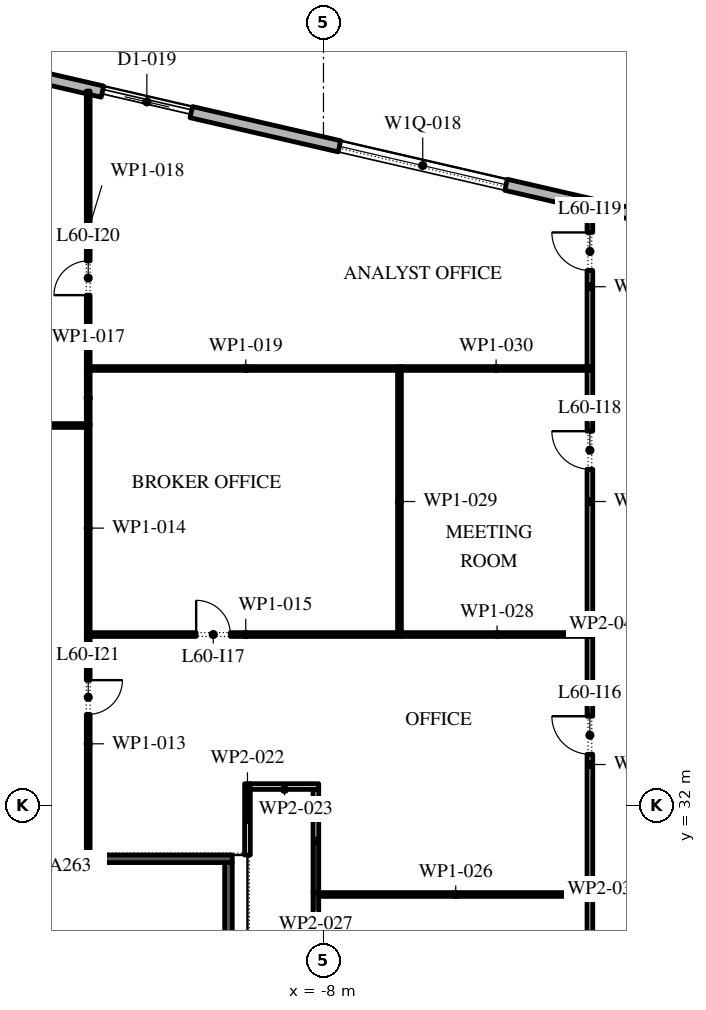
"""IFC4 building model, lengths in metres.
Left out: names, types, materials, properties, quantities, classifications, styles, units other than length and angle.
Written with IfcOpenShell. Run it as: python <this file> out.ifc"""

import sys

from ifc_helpers import new_model, si_unit, direction, frame, frame_2d, origin, place, context, subcontext, project, spatial, rectangle, extrude, element, fill, save


model = new_model("IFC4")
c1 = context("Model", 3, precision=1e-05, world=origin(), true_north=direction((0.0, 1.0)))
c2 = subcontext(c1, "Body", "Model", "MODEL_VIEW")
j1 = project(units=[si_unit("LENGTHUNIT", "METRE"), si_unit("PLANEANGLEUNIT", "RADIAN")], contexts=[c1])
p1 = place(None, origin())
s1 = spatial("IfcSite", under=j1, at=p1, CompositionType="ELEMENT")
p2 = place(p1, origin())
s2 = spatial("IfcBuilding", under=s1, at=p2, CompositionType="ELEMENT")
p3 = place(p2, frame((0.0, 0.0, 276.6)))
s3 = spatial("IfcBuildingStorey", under=s2, at=p3, CompositionType="ELEMENT", Elevation=276.6)
p4 = place(p3, frame((29.616, 40.758, 0.0), z_axis=(0.0, 0.0, 1.0), x_axis=(-0.974370532314, 0.224949029246, 0.0)))
e1 = element("IfcWall", 1, at=p4, inside=s3, PredefinedType="STANDARD", context=c2, shape_type="SweptSolid", body=[
    extrude(rectangle(XDim=48.0, YDim=0.3, at=frame_2d((24.0, 0.0))), origin(), (0.0, 0.0, 1.0), 4.0),
])
p5 = place(p4, frame((1.625, 0.0, 0.45)))
e2 = element("IfcOpeningElement", 2, at=p5, cuts=e1, PredefinedType="OPENING", context=c2, shape_type="SweptSolid", body=[
    extrude(rectangle(XDim=4.5, YDim=2.575, at=frame_2d((2.25, 1.288))), frame((0.0, 0.16, 0.0), z_axis=(0.0, -1.0, 0.0), x_axis=(1.0, 0.0, 0.0)), (0.0, 0.0, 1.0), 0.32),
])
p6 = place(p4, frame((10.575, 0.0, 0.0)))
e3 = element("IfcOpeningElement", 3, at=p6, cuts=e1, PredefinedType="OPENING", context=c2, shape_type="SweptSolid", body=[
    extrude(rectangle(XDim=2.4, YDim=3.5, at=frame_2d((1.2, 1.75))), frame((0.0, 0.16, 0.0), z_axis=(0.0, -1.0, 0.0), x_axis=(1.0, 0.0, 0.0)), (0.0, 0.0, 1.0), 0.32),
])
p7 = place(p4, frame((17.575, 0.0, 0.45)))
e4 = element("IfcOpeningElement", 4, at=p7, cuts=e1, PredefinedType="OPENING", context=c2, shape_type="SweptSolid", body=[
    extrude(rectangle(XDim=4.5, YDim=2.45, at=frame_2d((2.25, 1.225))), frame((0.0, 0.16, 0.0), z_axis=(0.0, -1.0, 0.0), x_axis=(1.0, 0.0, 0.0)), (0.0, 0.0, 1.0), 0.32),
])
p8 = place(p4, frame((25.625, 0.0, 0.45)))
e5 = element("IfcOpeningElement", 5, at=p8, cuts=e1, PredefinedType="OPENING", context=c2, shape_type="SweptSolid", body=[
    extrude(rectangle(XDim=4.5, YDim=2.45, at=frame_2d((2.25, 1.225))), frame((0.0, 0.16, 0.0), z_axis=(0.0, -1.0, 0.0), x_axis=(1.0, 0.0, 0.0)), (0.0, 0.0, 1.0), 0.32),
])
p9 = place(p4, frame((33.675, 0.0, 0.45)))
e6 = element("IfcOpeningElement", 6, at=p9, cuts=e1, PredefinedType="OPENING", context=c2, shape_type="SweptSolid", body=[
    extrude(rectangle(XDim=4.5, YDim=2.45, at=frame_2d((2.25, 1.225))), frame((0.0, 0.16, 0.0), z_axis=(0.0, -1.0, 0.0), x_axis=(1.0, 0.0, 0.0)), (0.0, 0.0, 1.0), 0.32),
])
p10 = place(p4, frame((42.175, 0.0, 0.0)))
e7 = element("IfcOpeningElement", 7, at=p10, cuts=e1, PredefinedType="OPENING", context=c2, shape_type="SweptSolid", body=[
    extrude(rectangle(XDim=2.4, YDim=3.5, at=frame_2d((1.2, 1.75))), frame((0.0, 0.16, 0.0), z_axis=(0.0, -1.0, 0.0), x_axis=(1.0, 0.0, 0.0)), (0.0, 0.0, 1.0), 0.32),
])
p11 = place(p3, frame((-10.5, 25.75, 0.0), z_axis=(0.0, 0.0, 1.0), x_axis=(0.0, 1.0, 0.0)))
e8 = element("IfcWall", 8, at=p11, inside=s3, PredefinedType="SHEAR", context=c2, shape_type="SweptSolid", body=[
    extrude(rectangle(XDim=4.75, YDim=0.2, at=frame_2d((2.375, 0.0))), origin(), (0.0, 0.0, 1.0), 4.0),
])
p12 = place(p11, frame((1.925, 0.0, 0.0)))
e9 = element("IfcOpeningElement", 9, at=p12, cuts=e8, PredefinedType="OPENING", context=c2, shape_type="SweptSolid", body=[
    extrude(rectangle(XDim=0.9, YDim=2.1, at=frame_2d((0.45, 1.05))), frame((0.0, 0.11, 0.0), z_axis=(0.0, -1.0, 0.0), x_axis=(1.0, 0.0, 0.0)), (0.0, 0.0, 1.0), 0.22),
])
p13 = place(p3, frame((-21.6, 30.6, 0.0), z_axis=(0.0, 0.0, 1.0), x_axis=(1.0, 0.0, 0.0)))
e10 = element("IfcWall", 10, at=p13, inside=s3, PredefinedType="SHEAR", context=c2, shape_type="SweptSolid", body=[
    extrude(rectangle(XDim=11.2, YDim=0.2, at=frame_2d((5.6, 0.0))), origin(), (0.0, 0.0, 1.0), 4.0),
])
p14 = place(p3, frame((-14.19, 30.7, 0.0), z_axis=(0.0, 0.0, 1.0), x_axis=(0.0, 1.0, 0.0)))
e11 = element("IfcWall", 11, at=p14, inside=s3, PredefinedType="PARTITIONING", context=c2, shape_type="SweptSolid", body=[
    extrude(rectangle(XDim=5.85, YDim=0.1, at=frame_2d((2.925, 0.0))), origin(), (0.0, 0.0, 1.0), 4.0),
])
p15 = place(p14, frame((3.7, 0.0, 0.0)))
e12 = element("IfcOpeningElement", 12, at=p15, cuts=e11, PredefinedType="OPENING", context=c2, shape_type="SweptSolid", body=[
    extrude(rectangle(XDim=0.9, YDim=2.1, at=frame_2d((0.45, 1.05))), frame((0.0, 0.06, 0.0), z_axis=(0.0, -1.0, 0.0), x_axis=(1.0, 0.0, 0.0)), (0.0, 0.0, 1.0), 0.12),
])
p16 = place(p3, frame((-14.19, 36.55, 0.0), z_axis=(0.0, 0.0, 1.0), x_axis=(0.0, 1.0, 0.0)))
e13 = element("IfcWall", 13, at=p16, inside=s3, PredefinedType="PARTITIONING", context=c2, shape_type="SweptSolid", body=[
    extrude(rectangle(XDim=5.5, YDim=0.1, at=frame_2d((2.75, 0.0))), origin(), (0.0, 0.0, 1.0), 4.0),
])
p17 = place(p3, frame((-14.14, 36.5, 0.0), z_axis=(0.0, 0.0, 1.0), x_axis=(1.0, 0.0, 0.0)))
e14 = element("IfcWall", 14, at=p17, inside=s3, PredefinedType="PARTITIONING", context=c2, shape_type="SweptSolid", body=[
    extrude(rectangle(XDim=8.19, YDim=0.1, at=frame_2d((4.095, 0.0))), origin(), (0.0, 0.0, 1.0), 4.0),
])
p18 = place(p17, frame((2.79, 0.0, 0.0)))
e15 = element("IfcOpeningElement", 15, at=p18, cuts=e14, PredefinedType="OPENING", context=c2, shape_type="SweptSolid", body=[
    extrude(rectangle(XDim=0.9, YDim=2.1, at=frame_2d((0.45, 1.05))), frame((0.0, 0.06, 0.0), z_axis=(0.0, -1.0, 0.0), x_axis=(1.0, 0.0, 0.0)), (0.0, 0.0, 1.0), 0.12),
])
p19 = place(p3, frame((-14.24, 42.0, 0.0), z_axis=(0.0, 0.0, 1.0), x_axis=(-1.0, 0.0, 0.0)))
e16 = element("IfcWall", 16, at=p19, inside=s3, PredefinedType="PARTITIONING", context=c2, shape_type="SweptSolid", body=[
    extrude(rectangle(XDim=8.589, YDim=0.1, at=frame_2d((4.294, 0.0))), origin(), (0.0, 0.0, 1.0), 4.0),
])
p20 = place(p3, frame((-14.19, 42.0, 0.0), z_axis=(0.0, 0.0, 1.0), x_axis=(0.0, 1.0, 0.0)))
e17 = element("IfcWall", 17, at=p20, inside=s3, PredefinedType="PARTITIONING", context=c2, shape_type="SweptSolid", body=[
    extrude(rectangle(XDim=1.45, YDim=0.1, at=frame_2d((0.725, 0.0))), origin(), (0.0, 0.0, 1.0), 4.0),
])
p21 = place(p3, frame((-14.19, 43.45, 0.0), z_axis=(0.0, 0.0, 1.0), x_axis=(0.0, 1.0, 0.0)))
e18 = element("IfcWall", 18, at=p21, inside=s3, PredefinedType="PARTITIONING", context=c2, shape_type="SweptSolid", body=[
    extrude(rectangle(XDim=7.35, YDim=0.1, at=frame_2d((3.675, 0.0))), origin(), (0.0, 0.0, 1.0), 4.0),
])
p22 = place(p21, frame((1.98, 0.0, 0.0)))
e19 = element("IfcOpeningElement", 19, at=p22, cuts=e18, PredefinedType="OPENING", context=c2, shape_type="SweptSolid", body=[
    extrude(rectangle(XDim=0.9, YDim=2.1, at=frame_2d((0.45, 1.05))), frame((0.0, 0.06, 0.0), z_axis=(0.0, -1.0, 0.0), x_axis=(1.0, 0.0, 0.0)), (0.0, 0.0, 1.0), 0.12),
])
p23 = place(p3, frame((-14.14, 43.5, 0.0), z_axis=(0.0, 0.0, 1.0), x_axis=(1.0, 0.0, 0.0)))
e20 = element("IfcWall", 20, at=p23, inside=s3, PredefinedType="PARTITIONING", context=c2, shape_type="SweptSolid", body=[
    extrude(rectangle(XDim=8.19, YDim=0.1, at=frame_2d((4.095, 0.0))), origin(), (0.0, 0.0, 1.0), 4.0),
])
p24 = place(p3, frame((-10.0, 30.7, 0.0), z_axis=(0.0, 0.0, 1.0), x_axis=(0.0, 1.0, 0.0)))
e21 = element("IfcWall", 21, at=p24, inside=s3, PredefinedType="PARTITIONING", context=c2, shape_type="SweptSolid", body=[
    extrude(rectangle(XDim=1.875, YDim=0.15, at=frame_2d((0.938, 0.0))), origin(), (0.0, 0.0, 1.0), 4.0),
])
p25 = place(p3, frame((-9.925, 32.5, 0.0), z_axis=(0.0, 0.0, 1.0), x_axis=(1.0, 0.0, 0.0)))
e22 = element("IfcWall", 22, at=p25, inside=s3, PredefinedType="PARTITIONING", context=c2, shape_type="SweptSolid", body=[
    extrude(rectangle(XDim=1.8, YDim=0.15, at=frame_2d((0.9, 0.0))), origin(), (0.0, 0.0, 1.0), 4.0),
])
p26 = place(p3, frame((-8.2, 29.71, 0.0), z_axis=(0.0, 0.0, 1.0), x_axis=(0.0, -1.0, 0.0)))
e23 = element("IfcWall", 23, at=p26, inside=s3, PredefinedType="PARTITIONING", context=c2, shape_type="SweptSolid", body=[
    extrude(rectangle(XDim=10.635, YDim=0.15, at=frame_2d((5.317, 0.0))), origin(), (0.0, 0.0, 1.0), 4.0),
])
p27 = place(p26, frame((2.81, 0.0, 0.0)))
e24 = element("IfcOpeningElement", 24, at=p27, cuts=e23, PredefinedType="OPENING", context=c2, shape_type="SweptSolid", body=[
    extrude(rectangle(XDim=1.0, YDim=2.1, at=frame_2d((0.5, 1.05))), frame((0.0, 0.085, 0.0), z_axis=(0.0, -1.0, 0.0), x_axis=(1.0, 0.0, 0.0)), (0.0, 0.0, 1.0), 0.17),
])
p28 = place(p3, frame((-8.125, 29.66, 0.0), z_axis=(0.0, 0.0, 1.0), x_axis=(1.0, 0.0, 0.0)))
e25 = element("IfcWall", 25, at=p28, inside=s3, PredefinedType="PARTITIONING", context=c2, shape_type="SweptSolid", body=[
    extrude(rectangle(XDim=7.21, YDim=0.1, at=frame_2d((3.605, 0.0))), origin(), (0.0, 0.0, 1.0), 4.0),
])
p29 = place(p3, frame((-8.2, 32.425, 0.0), z_axis=(0.0, 0.0, 1.0), x_axis=(0.0, -1.0, 0.0)))
e26 = element("IfcWall", 26, at=p29, inside=s3, PredefinedType="PARTITIONING", context=c2, shape_type="SweptSolid", body=[
    extrude(rectangle(XDim=2.715, YDim=0.15, at=frame_2d((1.357, 0.0))), origin(), (0.0, 0.0, 1.0), 4.0),
])
p30 = place(p3, frame((-5.95, 36.5, 0.0), z_axis=(0.0, 0.0, 1.0), x_axis=(1.0, 0.0, 0.0)))
e27 = element("IfcWall", 27, at=p30, inside=s3, PredefinedType="PARTITIONING", context=c2, shape_type="SweptSolid", body=[
    extrude(rectangle(XDim=5.035, YDim=0.1, at=frame_2d((2.518, 0.0))), origin(), (0.0, 0.0, 1.0), 4.0),
])
p31 = place(p3, frame((-6.0, 43.45, 0.0), z_axis=(0.0, 0.0, 1.0), x_axis=(0.0, -1.0, 0.0)))
e28 = element("IfcWall", 28, at=p31, inside=s3, PredefinedType="PARTITIONING", context=c2, shape_type="SweptSolid", body=[
    extrude(rectangle(XDim=6.9, YDim=0.1, at=frame_2d((3.45, 0.0))), origin(), (0.0, 0.0, 1.0), 4.0),
])
p32 = place(p3, frame((-6.0, 43.5, 0.0), z_axis=(0.0, 0.0, 1.0), x_axis=(1.0, 0.0, 0.0)))
e29 = element("IfcWall", 29, at=p32, inside=s3, PredefinedType="PARTITIONING", context=c2, shape_type="SweptSolid", body=[
    extrude(rectangle(XDim=5.085, YDim=0.1, at=frame_2d((2.542, 0.0))), origin(), (0.0, 0.0, 1.0), 4.0),
])
p33 = place(p3, frame((-0.99, 19.075, 0.0), z_axis=(0.0, 0.0, 1.0), x_axis=(0.0, 1.0, 0.0)))
e30 = element("IfcWall", 30, at=p33, inside=s3, PredefinedType="PARTITIONING", context=c2, shape_type="SweptSolid", body=[
    extrude(rectangle(XDim=10.535, YDim=0.15, at=frame_2d((5.268, 0.0))), origin(), (0.0, 0.0, 1.0), 4.0),
])
p34 = place(p3, frame((-0.99, 29.71, 0.0), z_axis=(0.0, 0.0, 1.0), x_axis=(0.0, 1.0, 0.0)))
e31 = element("IfcWall", 31, at=p34, inside=s3, PredefinedType="PARTITIONING", context=c2, shape_type="SweptSolid", body=[
    extrude(rectangle(XDim=6.74, YDim=0.15, at=frame_2d((3.37, 0.0))), origin(), (0.0, 0.0, 1.0), 4.0),
])
p35 = place(p34, frame((3.64, 0.0, 0.0)))
e32 = element("IfcOpeningElement", 32, at=p35, cuts=e31, PredefinedType="OPENING", context=c2, shape_type="SweptSolid", body=[
    extrude(rectangle(XDim=1.0, YDim=2.1, at=frame_2d((0.5, 1.05))), frame((0.0, 0.085, 0.0), z_axis=(0.0, -1.0, 0.0), x_axis=(1.0, 0.0, 0.0)), (0.0, 0.0, 1.0), 0.17),
])
p36 = place(p3, frame((-0.99, 36.55, 0.0), z_axis=(0.0, 0.0, 1.0), x_axis=(0.0, 1.0, 0.0)))
e33 = element("IfcWall", 33, at=p36, inside=s3, PredefinedType="PARTITIONING", context=c2, shape_type="SweptSolid", body=[
    extrude(rectangle(XDim=6.9, YDim=0.15, at=frame_2d((3.45, 0.0))), origin(), (0.0, 0.0, 1.0), 4.0),
])
p37 = place(p36, frame((4.3, 0.0, 0.0)))
e34 = element("IfcOpeningElement", 34, at=p37, cuts=e33, PredefinedType="OPENING", context=c2, shape_type="SweptSolid", body=[
    extrude(rectangle(XDim=1.0, YDim=2.1, at=frame_2d((0.5, 1.05))), frame((0.0, 0.085, 0.0), z_axis=(0.0, -1.0, 0.0), x_axis=(1.0, 0.0, 0.0)), (0.0, 0.0, 1.0), 0.17),
])
p38 = place(p3, frame((-0.99, 43.55, 0.0), z_axis=(0.0, 0.0, 1.0), x_axis=(0.0, 1.0, 0.0)))
e35 = element("IfcWall", 35, at=p38, inside=s3, PredefinedType="PARTITIONING", context=c2, shape_type="SweptSolid", body=[
    extrude(rectangle(XDim=4.203, YDim=0.15, at=frame_2d((2.102, 0.0))), origin(), (0.0, 0.0, 1.0), 4.0),
])
p39 = place(p38, frame((2.53, 0.0, 0.0)))
e36 = element("IfcOpeningElement", 36, at=p39, cuts=e35, PredefinedType="OPENING", context=c2, shape_type="SweptSolid", body=[
    extrude(rectangle(XDim=1.0, YDim=2.1, at=frame_2d((0.5, 1.05))), frame((0.0, 0.085, 0.0), z_axis=(0.0, -1.0, 0.0), x_axis=(1.0, 0.0, 0.0)), (0.0, 0.0, 1.0), 0.17),
])
p40 = place(p9, origin())
e37 = element("IfcWindow", 37, at=p40, inside=s3, PartitioningType="DOUBLE_PANEL_VERTICAL", PredefinedType="WINDOW", context=c2, shape_type="SweptSolid", body=[
    extrude(rectangle(XDim=4.5, YDim=2.45, at=frame_2d((2.25, 1.225))), frame((0.0, 0.03, 0.0), z_axis=(0.0, -1.0, 0.0), x_axis=(1.0, 0.0, 0.0)), (0.0, 0.0, 1.0), 0.06),
])
fill(e6, e37)
p41 = place(p10, origin())
e38 = element("IfcDoor", 38, at=p41, inside=s3, OperationType="DOUBLE_DOOR_SLIDING", PredefinedType="DOOR", context=c2, shape_type="SweptSolid", body=[
    extrude(rectangle(XDim=2.4, YDim=3.5, at=frame_2d((1.2, 1.75))), frame((0.0, 0.025, 0.0), z_axis=(0.0, -1.0, 0.0), x_axis=(1.0, 0.0, 0.0)), (0.0, 0.0, 1.0), 0.05),
])
fill(e7, e38)
p42 = place(p35, origin())
e39 = element("IfcDoor", 39, at=p42, inside=s3, OperationType="SINGLE_SWING_LEFT", PredefinedType="DOOR", context=c2, shape_type="SweptSolid", body=[
    extrude(rectangle(XDim=1.0, YDim=2.1, at=frame_2d((0.5, 1.05))), frame((0.0, 0.025, 0.0), z_axis=(0.0, -1.0, 0.0), x_axis=(1.0, 0.0, 0.0)), (0.0, 0.0, 1.0), 0.05),
])
fill(e32, e39)
p43 = place(p18, origin())
e40 = element("IfcDoor", 40, at=p43, inside=s3, OperationType="SINGLE_SWING_RIGHT", PredefinedType="DOOR", context=c2, shape_type="SweptSolid", body=[
    extrude(rectangle(XDim=0.9, YDim=2.1, at=frame_2d((0.45, 1.05))), frame((0.0, 0.025, 0.0), z_axis=(0.0, -1.0, 0.0), x_axis=(1.0, 0.0, 0.0)), (0.0, 0.0, 1.0), 0.05),
])
fill(e15, e40)
p44 = place(p37, origin())
e41 = element("IfcDoor", 41, at=p44, inside=s3, OperationType="SINGLE_SWING_LEFT", PredefinedType="DOOR", context=c2, shape_type="SweptSolid", body=[
    extrude(rectangle(XDim=1.0, YDim=2.1, at=frame_2d((0.5, 1.05))), frame((0.0, 0.025, 0.0), z_axis=(0.0, -1.0, 0.0), x_axis=(1.0, 0.0, 0.0)), (0.0, 0.0, 1.0), 0.05),
])
fill(e34, e41)
p45 = place(p39, origin())
e42 = element("IfcDoor", 42, at=p45, inside=s3, OperationType="SINGLE_SWING_LEFT", PredefinedType="DOOR", context=c2, shape_type="SweptSolid", body=[
    extrude(rectangle(XDim=1.0, YDim=2.1, at=frame_2d((0.5, 1.05))), frame((0.0, 0.025, 0.0), z_axis=(0.0, -1.0, 0.0), x_axis=(1.0, 0.0, 0.0)), (0.0, 0.0, 1.0), 0.05),
])
fill(e36, e42)
p46 = place(p22, origin())
e43 = element("IfcDoor", 43, at=p46, inside=s3, OperationType="SINGLE_SWING_RIGHT", PredefinedType="DOOR", context=c2, shape_type="SweptSolid", body=[
    extrude(rectangle(XDim=0.9, YDim=2.1, at=frame_2d((0.45, 1.05))), frame((0.0, 0.025, 0.0), z_axis=(0.0, -1.0, 0.0), x_axis=(1.0, 0.0, 0.0)), (0.0, 0.0, 1.0), 0.05),
])
fill(e19, e43)
p47 = place(p15, frame((0.9, 0.0, 0.0), z_axis=(0.0, 0.0, 1.0), x_axis=(-1.0, 0.0, 0.0)))
e44 = element("IfcDoor", 44, at=p47, inside=s3, OperationType="SINGLE_SWING_RIGHT", PredefinedType="DOOR", context=c2, shape_type="SweptSolid", body=[
    extrude(rectangle(XDim=0.9, YDim=2.1, at=frame_2d((0.45, 1.05))), frame((0.0, 0.025, 0.0), z_axis=(0.0, -1.0, 0.0), x_axis=(1.0, 0.0, 0.0)), (0.0, 0.0, 1.0), 0.05),
])
fill(e12, e44)
save(model, sys.argv[1])
